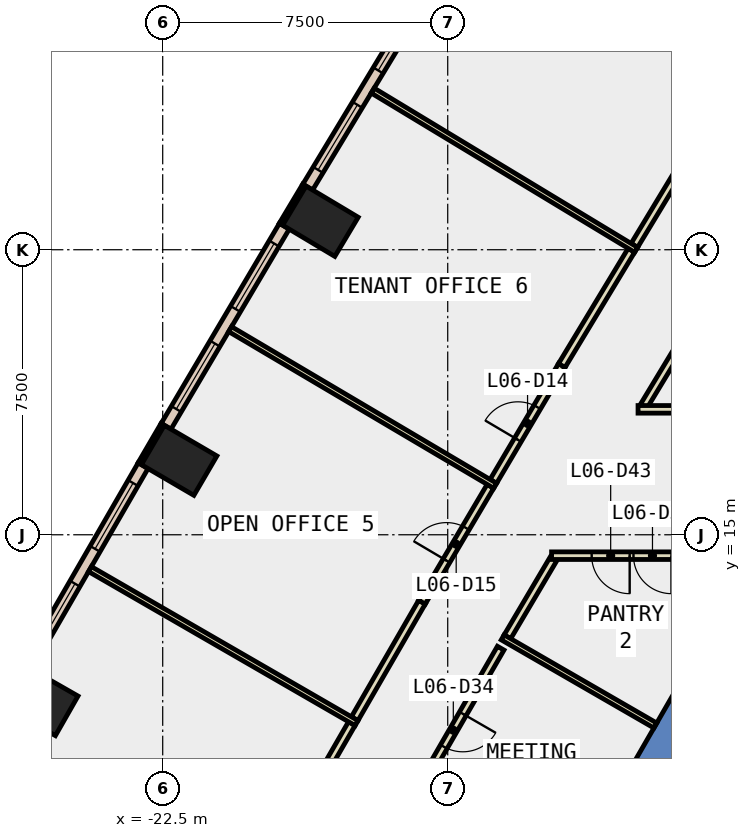
"""IFC4 building model, lengths in metres.
Left out: names, types, materials, properties, quantities, classifications, styles, units other than length and angle.
Written with IfcOpenShell. Run it as: python <this file> out.ifc"""

import sys

from ifc_helpers import new_model, si_unit, direction, frame, frame_2d, origin, origin_2d, place, context, subcontext, project, spatial, polyline, rectangle, outline, extrude, element, fill, save


model = new_model("IFC4")
c1 = context("Model", 3, precision=1e-05, world=origin(), true_north=direction((0.0, 1.0)))
c2 = subcontext(c1, "Body", "Model", "MODEL_VIEW")
j1 = project(units=[si_unit("LENGTHUNIT", "METRE"), si_unit("PLANEANGLEUNIT", "RADIAN")], contexts=[c1])
p1 = place(None, origin())
s1 = spatial("IfcSite", under=j1, at=p1, CompositionType="ELEMENT")
p2 = place(p1, origin())
s2 = spatial("IfcBuilding", under=s1, at=p2, CompositionType="ELEMENT")
p3 = place(p2, frame((0.0, 0.0, 35.0)))
s3 = spatial("IfcBuildingStorey", under=s2, at=p3, CompositionType="ELEMENT", Elevation=35.0)
for number, where, z_axis, x_axis in (
    (1, (-18.35, 23.25, -0.6), (0.0, 0.0, 1.0), (0.513, 0.858, 0.0)),
    (2, (-22.068, 16.959, -0.6), (0.0, 0.0, 1.0), (0.504, 0.864, 0.0)),
    (3, (-25.721, 10.632, -0.6), (0.0, 0.0, 1.0), (0.496, 0.869, 0.0)),
):
    element("IfcColumn", number, at=place(p3, frame(where, z_axis=z_axis, x_axis=x_axis)), inside=s3, PredefinedType="COLUMN", context=c2, shape_type="SweptSolid", body=[
        extrude(rectangle(XDim=1.2, YDim=1.6, at=origin_2d()), origin(), (0.0, 0.0, 1.0), 4.4),
    ])
p4 = place(p3, frame((0.0, 0.0, -0.6)))
e4 = element("IfcWall", 4, at=p4, inside=s3, PredefinedType="SHEAR", context=c2, shape_type="SweptSolid", body=[
    extrude(outline(polyline([(-12.267, 5.252), (-11.402, 4.752), (-6.351, 13.5), (-6.928, 14.5), (-12.267, 5.252)])), origin(), (0.0, 0.0, 1.0), 4.4),
])
p5 = place(p3, frame((-18.772, 24.201, 0.0), z_axis=(0.0, 0.0, 1.0), x_axis=(-0.513238760752, -0.858245870635, 0.0)))
e5 = element("IfcWall", 5, at=p5, inside=s3, PredefinedType="STANDARD", context=c2, shape_type="SweptSolid", body=[
    extrude(rectangle(XDim=1.2, YDim=0.1, at=frame_2d((0.6, 0.0))), origin(), (0.0, 0.0, 1.0), 3.8),
])
p6 = place(p3, frame((-22.499, 17.906, 0.0), z_axis=(0.0, 0.0, 1.0), x_axis=(-0.504313844903, -0.863520437418, 0.0)))
e6 = element("IfcWall", 6, at=p6, inside=s3, PredefinedType="STANDARD", context=c2, shape_type="SweptSolid", body=[
    extrude(rectangle(XDim=1.2, YDim=0.1, at=frame_2d((0.6, 0.0))), origin(), (0.0, 0.0, 1.0), 3.8),
])
p7 = place(p3, frame((-15.521, 29.382, 0.0), z_axis=(0.0, 0.0, 1.0), x_axis=(-0.517211293816, -0.855857743757, 0.0)))
e7 = element("IfcWall", 7, at=p7, inside=s3, PredefinedType="STANDARD", context=c2, shape_type="SweptSolid", body=[
    extrude(rectangle(XDim=6.116, YDim=0.3, at=frame_2d((3.058, 0.0))), origin(), (0.0, 0.0, 1.0), 3.8),
])
p8 = place(p7, frame((0.529, 0.0, 0.9)))
e8 = element("IfcOpeningElement", 8, at=p8, cuts=e7, PredefinedType="OPENING", context=c2, shape_type="SweptSolid", body=[
    extrude(rectangle(XDim=2.0, YDim=2.6, at=frame_2d((1.0, 1.3))), frame((0.0, 0.16, 0.0), z_axis=(0.0, -1.0, 0.0), x_axis=(1.0, 0.0, 0.0)), (0.0, 0.0, 1.0), 0.32),
])
p9 = place(p7, frame((3.587, 0.0, 0.9)))
e9 = element("IfcOpeningElement", 9, at=p9, cuts=e7, PredefinedType="OPENING", context=c2, shape_type="SweptSolid", body=[
    extrude(rectangle(XDim=2.0, YDim=2.6, at=frame_2d((1.0, 1.3))), frame((0.0, 0.16, 0.0), z_axis=(0.0, -1.0, 0.0), x_axis=(1.0, 0.0, 0.0)), (0.0, 0.0, 1.0), 0.32),
])
p10 = place(p3, frame((-19.299, 23.119, 0.0), z_axis=(0.0, 0.0, 1.0), x_axis=(-0.508749483145, -0.860914608658, 0.0)))
e10 = element("IfcWall", 10, at=p10, inside=s3, PredefinedType="STANDARD", context=c2, shape_type="SweptSolid", body=[
    extrude(rectangle(XDim=6.117, YDim=0.3, at=frame_2d((3.058, 0.0))), origin(), (0.0, 0.0, 1.0), 3.8),
])
p11 = place(p10, frame((0.529, 0.0, 0.9)))
e11 = element("IfcOpeningElement", 11, at=p11, cuts=e10, PredefinedType="OPENING", context=c2, shape_type="SweptSolid", body=[
    extrude(rectangle(XDim=2.0, YDim=2.6, at=frame_2d((1.0, 1.3))), frame((0.0, 0.16, 0.0), z_axis=(0.0, -1.0, 0.0), x_axis=(1.0, 0.0, 0.0)), (0.0, 0.0, 1.0), 0.32),
])
p12 = place(p10, frame((3.588, 0.0, 0.9)))
e12 = element("IfcOpeningElement", 12, at=p12, cuts=e10, PredefinedType="OPENING", context=c2, shape_type="SweptSolid", body=[
    extrude(rectangle(XDim=2.0, YDim=2.6, at=frame_2d((1.0, 1.3))), frame((0.0, 0.16, 0.0), z_axis=(0.0, -1.0, 0.0), x_axis=(1.0, 0.0, 0.0)), (0.0, 0.0, 1.0), 0.32),
])
p13 = place(p3, frame((-23.015, 16.819, 0.0), z_axis=(0.0, 0.0, 1.0), x_axis=(-0.499976985038, -0.866038691071, 0.0)))
e13 = element("IfcWall", 13, at=p13, inside=s3, PredefinedType="STANDARD", context=c2, shape_type="SweptSolid", body=[
    extrude(rectangle(XDim=6.116, YDim=0.3, at=frame_2d((3.058, 0.0))), origin(), (0.0, 0.0, 1.0), 3.8),
])
p14 = place(p13, frame((0.529, 0.0, 0.9)))
e14 = element("IfcOpeningElement", 14, at=p14, cuts=e13, PredefinedType="OPENING", context=c2, shape_type="SweptSolid", body=[
    extrude(rectangle(XDim=2.0, YDim=2.6, at=frame_2d((1.0, 1.3))), frame((0.0, 0.16, 0.0), z_axis=(0.0, -1.0, 0.0), x_axis=(1.0, 0.0, 0.0)), (0.0, 0.0, 1.0), 0.32),
])
p15 = place(p13, frame((3.587, 0.0, 0.9)))
e15 = element("IfcOpeningElement", 15, at=p15, cuts=e13, PredefinedType="OPENING", context=c2, shape_type="SweptSolid", body=[
    extrude(rectangle(XDim=2.0, YDim=2.6, at=frame_2d((1.0, 1.3))), frame((0.0, 0.16, 0.0), z_axis=(0.0, -1.0, 0.0), x_axis=(1.0, 0.0, 0.0)), (0.0, 0.0, 1.0), 0.32),
])
p16 = place(p3, frame((-13.606, 12.016, 0.0), z_axis=(0.0, 0.0, 1.0), x_axis=(-0.499992180995, -0.866029918042, 0.0)))
e16 = element("IfcWall", 16, at=p16, inside=s3, PredefinedType="PARTITIONING", context=c2, shape_type="SweptSolid", body=[
    extrude(rectangle(XDim=4.988, YDim=0.2, at=frame_2d((2.494, 0.0))), origin(), (0.0, 0.0, 1.0), 3.8),
])
p17 = place(p16, frame((1.994, 0.0, 0.0)))
e17 = element("IfcOpeningElement", 17, at=p17, cuts=e16, PredefinedType="OPENING", context=c2, shape_type="SweptSolid", body=[
    extrude(rectangle(XDim=1.0, YDim=2.1, at=frame_2d((0.5, 1.05))), frame((0.0, 0.11, 0.0), z_axis=(0.0, -1.0, 0.0), x_axis=(1.0, 0.0, 0.0)), (0.0, 0.0, 1.0), 0.22),
])
p18 = place(p3, frame((-12.218, 14.364, 0.0), z_axis=(0.0, 0.0, 1.0), x_axis=(-0.508767325294, -0.860904064756, 0.0)))
e18 = element("IfcWall", 18, at=p18, inside=s3, PredefinedType="PARTITIONING", context=c2, shape_type="SweptSolid", body=[
    extrude(rectangle(XDim=2.38, YDim=0.2, at=frame_2d((1.19, 0.0))), origin(), (0.0, 0.0, 1.0), 3.8),
])
p19 = place(p3, frame((-6.209, 24.392, 0.0), z_axis=(0.0, 0.0, 1.0), x_axis=(-0.51736780002, -0.85576314451, 0.0)))
e19 = element("IfcWall", 19, at=p19, inside=s3, PredefinedType="PARTITIONING", context=c2, shape_type="SweptSolid", body=[
    extrude(rectangle(XDim=7.018, YDim=0.2, at=frame_2d((3.509, 0.0))), origin(), (0.0, 0.0, 1.0), 3.8),
])
p20 = place(p3, frame((-10.089, 22.613, 0.0), z_axis=(0.0, 0.0, 1.0), x_axis=(0.517280808896, 0.855815730603, 0.0)))
e20 = element("IfcWall", 20, at=p20, inside=s3, PredefinedType="PARTITIONING", context=c2, shape_type="SweptSolid", body=[
    extrude(rectangle(XDim=3.542, YDim=0.2, at=frame_2d((1.771, 0.0))), origin(), (0.0, 0.0, 1.0), 3.8),
])
p21 = place(p3, frame((-13.8, 16.404, 0.0), z_axis=(0.0, 0.0, 1.0), x_axis=(0.508666621784, 0.860963569428, 0.0)))
e21 = element("IfcWall", 21, at=p21, inside=s3, PredefinedType="PARTITIONING", context=c2, shape_type="SweptSolid", body=[
    extrude(rectangle(XDim=3.542, YDim=0.2, at=frame_2d((1.771, 0.0))), origin(), (0.0, 0.0, 1.0), 3.8),
])
p22 = place(p21, frame((1.271, 0.0, 0.0)))
e22 = element("IfcOpeningElement", 22, at=p22, cuts=e21, PredefinedType="OPENING", context=c2, shape_type="SweptSolid", body=[
    extrude(rectangle(XDim=1.0, YDim=2.1, at=frame_2d((0.5, 1.05))), frame((0.0, 0.11, 0.0), z_axis=(0.0, -1.0, 0.0), x_axis=(1.0, 0.0, 0.0)), (0.0, 0.0, 1.0), 0.22),
])
p23 = place(p3, frame((-11.998, 19.454, 0.0), z_axis=(0.0, 0.0, 1.0), x_axis=(0.51707881094, 0.85593779171, 0.0)))
e23 = element("IfcWall", 23, at=p23, inside=s3, PredefinedType="PARTITIONING", context=c2, shape_type="SweptSolid", body=[
    extrude(rectangle(XDim=3.541, YDim=0.2, at=frame_2d((1.771, 0.0))), origin(), (0.0, 0.0, 1.0), 3.8),
])
p24 = place(p3, frame((-17.448, 10.16, 0.0), z_axis=(0.0, 0.0, 1.0), x_axis=(0.499951278228, 0.866053531485, 0.0)))
e24 = element("IfcWall", 24, at=p24, inside=s3, PredefinedType="PARTITIONING", context=c2, shape_type="SweptSolid", body=[
    extrude(rectangle(XDim=3.54, YDim=0.2, at=frame_2d((1.77, 0.0))), origin(), (0.0, 0.0, 1.0), 3.8),
])
p25 = place(p3, frame((-15.678, 13.226, 0.0), z_axis=(0.0, 0.0, 1.0), x_axis=(0.508613166028, 0.860995149431, 0.0)))
e25 = element("IfcWall", 25, at=p25, inside=s3, PredefinedType="PARTITIONING", context=c2, shape_type="SweptSolid", body=[
    extrude(rectangle(XDim=3.541, YDim=0.2, at=frame_2d((1.771, 0.0))), origin(), (0.0, 0.0, 1.0), 3.8),
])
p26 = place(p25, frame((1.271, 0.0, 0.0)))
e26 = element("IfcOpeningElement", 26, at=p26, cuts=e25, PredefinedType="OPENING", context=c2, shape_type="SweptSolid", body=[
    extrude(rectangle(XDim=1.0, YDim=2.1, at=frame_2d((0.5, 1.05))), frame((0.0, 0.11, 0.0), z_axis=(0.0, -1.0, 0.0), x_axis=(1.0, 0.0, 0.0)), (0.0, 0.0, 1.0), 0.22),
])
p27 = place(p3, frame((-19.294, 6.964, 0.0), z_axis=(0.0, 0.0, 1.0), x_axis=(0.499861717316, 0.86610522661, 0.0)))
e27 = element("IfcWall", 27, at=p27, inside=s3, PredefinedType="PARTITIONING", context=c2, shape_type="SweptSolid", body=[
    extrude(rectangle(XDim=3.541, YDim=0.2, at=frame_2d((1.771, 0.0))), origin(), (0.0, 0.0, 1.0), 3.8),
])
p28 = place(p3, frame((-13.554, 12.3, 0.0), z_axis=(0.0, 0.0, 1.0), x_axis=(0.866028685375, -0.499994316075, 0.0)))
e28 = element("IfcWall", 28, at=p28, inside=s3, PredefinedType="PARTITIONING", context=c2, shape_type="SweptSolid", body=[
    extrude(rectangle(XDim=4.638, YDim=0.15, at=frame_2d((2.319, 0.0))), origin(), (0.0, 0.0, 1.0), 3.8),
])
p29 = place(p3, frame((-6.957, 14.45, 0.0), z_axis=(0.0, 0.0, 1.0), x_axis=(-1.0, 0.0, 0.0)))
e29 = element("IfcWall", 29, at=p29, inside=s3, PredefinedType="PARTITIONING", context=c2, shape_type="SweptSolid", body=[
    extrude(rectangle(XDim=5.31, YDim=0.2, at=frame_2d((2.655, 0.0))), origin(), (0.0, 0.0, 1.0), 3.8),
])
p30 = place(p29, frame((2.155, 0.0, 0.0)))
e30 = element("IfcOpeningElement", 30, at=p30, cuts=e29, PredefinedType="OPENING", context=c2, shape_type="SweptSolid", body=[
    extrude(rectangle(XDim=1.0, YDim=2.1, at=frame_2d((0.5, 1.05))), frame((0.0, 0.11, 0.0), z_axis=(0.0, -1.0, 0.0), x_axis=(1.0, 0.0, 0.0)), (0.0, 0.0, 1.0), 0.22),
])
p31 = place(p29, frame((3.255, 0.0, 0.0)))
e31 = element("IfcOpeningElement", 31, at=p31, cuts=e29, PredefinedType="OPENING", context=c2, shape_type="SweptSolid", body=[
    extrude(rectangle(XDim=1.0, YDim=2.1, at=frame_2d((0.5, 1.05))), frame((0.0, 0.11, 0.0), z_axis=(0.0, -1.0, 0.0), x_axis=(1.0, 0.0, 0.0)), (0.0, 0.0, 1.0), 0.22),
])
p32 = place(p3, frame((-9.992, 18.3, 0.0), z_axis=(0.0, 0.0, 1.0), x_axis=(1.0, 0.0, 0.0)))
e32 = element("IfcWall", 32, at=p32, inside=s3, PredefinedType="PARTITIONING", context=c2, shape_type="SweptSolid", body=[
    extrude(rectangle(XDim=9.592, YDim=0.2, at=frame_2d((4.796, 0.0))), origin(), (0.0, 0.0, 1.0), 3.8),
])
p33 = place(p3, frame((-10.042, 22.497, 0.0), z_axis=(0.0, 0.0, 1.0), x_axis=(-0.855818252, 0.517276637346, 0.0)))
e33 = element("IfcWall", 33, at=p33, inside=s3, PredefinedType="PARTITIONING", context=c2, shape_type="SweptSolid", body=[
    extrude(rectangle(XDim=8.1, YDim=0.15, at=frame_2d((4.05, 0.0))), origin(), (0.0, 0.0, 1.0), 3.8),
])
p34 = place(p3, frame((-13.752, 16.289, 0.0), z_axis=(0.0, 0.0, 1.0), x_axis=(-0.86093852802, 0.508709004216, 0.0)))
e34 = element("IfcWall", 34, at=p34, inside=s3, PredefinedType="PARTITIONING", context=c2, shape_type="SweptSolid", body=[
    extrude(rectangle(XDim=8.101, YDim=0.15, at=frame_2d((4.05, 0.0))), origin(), (0.0, 0.0, 1.0), 3.8),
])
p35 = place(p3, frame((-17.399, 10.045, 0.0), z_axis=(0.0, 0.0, 1.0), x_axis=(-0.865980803489, 0.500077242023, 0.0)))
e35 = element("IfcWall", 35, at=p35, inside=s3, PredefinedType="PARTITIONING", context=c2, shape_type="SweptSolid", body=[
    extrude(rectangle(XDim=8.101, YDim=0.15, at=frame_2d((4.05, 0.0))), origin(), (0.0, 0.0, 1.0), 3.8),
])
p36 = place(p8, origin())
e36 = element("IfcWindow", 36, at=p36, inside=s3, PartitioningType="SINGLE_PANEL", PredefinedType="WINDOW", context=c2, shape_type="SweptSolid", body=[
    extrude(rectangle(XDim=2.0, YDim=2.6, at=frame_2d((1.0, 1.3))), frame((0.0, 0.03, 0.0), z_axis=(0.0, -1.0, 0.0), x_axis=(1.0, 0.0, 0.0)), (0.0, 0.0, 1.0), 0.06),
])
fill(e8, e36)
p37 = place(p9, origin())
e37 = element("IfcWindow", 37, at=p37, inside=s3, PartitioningType="SINGLE_PANEL", PredefinedType="WINDOW", context=c2, shape_type="SweptSolid", body=[
    extrude(rectangle(XDim=2.0, YDim=2.6, at=frame_2d((1.0, 1.3))), frame((0.0, 0.03, 0.0), z_axis=(0.0, -1.0, 0.0), x_axis=(1.0, 0.0, 0.0)), (0.0, 0.0, 1.0), 0.06),
])
fill(e9, e37)
p38 = place(p11, origin())
e38 = element("IfcWindow", 38, at=p38, inside=s3, PartitioningType="SINGLE_PANEL", PredefinedType="WINDOW", context=c2, shape_type="SweptSolid", body=[
    extrude(rectangle(XDim=2.0, YDim=2.6, at=frame_2d((1.0, 1.3))), frame((0.0, 0.03, 0.0), z_axis=(0.0, -1.0, 0.0), x_axis=(1.0, 0.0, 0.0)), (0.0, 0.0, 1.0), 0.06),
])
fill(e11, e38)
p39 = place(p12, origin())
e39 = element("IfcWindow", 39, at=p39, inside=s3, PartitioningType="SINGLE_PANEL", PredefinedType="WINDOW", context=c2, shape_type="SweptSolid", body=[
    extrude(rectangle(XDim=2.0, YDim=2.6, at=frame_2d((1.0, 1.3))), frame((0.0, 0.03, 0.0), z_axis=(0.0, -1.0, 0.0), x_axis=(1.0, 0.0, 0.0)), (0.0, 0.0, 1.0), 0.06),
])
fill(e12, e39)
p40 = place(p14, origin())
e40 = element("IfcWindow", 40, at=p40, inside=s3, PartitioningType="SINGLE_PANEL", PredefinedType="WINDOW", context=c2, shape_type="SweptSolid", body=[
    extrude(rectangle(XDim=2.0, YDim=2.6, at=frame_2d((1.0, 1.3))), frame((0.0, 0.03, 0.0), z_axis=(0.0, -1.0, 0.0), x_axis=(1.0, 0.0, 0.0)), (0.0, 0.0, 1.0), 0.06),
])
fill(e14, e40)
p41 = place(p15, origin())
e41 = element("IfcWindow", 41, at=p41, inside=s3, PartitioningType="SINGLE_PANEL", PredefinedType="WINDOW", context=c2, shape_type="SweptSolid", body=[
    extrude(rectangle(XDim=2.0, YDim=2.6, at=frame_2d((1.0, 1.3))), frame((0.0, 0.03, 0.0), z_axis=(0.0, -1.0, 0.0), x_axis=(1.0, 0.0, 0.0)), (0.0, 0.0, 1.0), 0.06),
])
fill(e15, e41)
p42 = place(p22, origin())
e42 = element("IfcDoor", 42, at=p42, inside=s3, OperationType="SINGLE_SWING_LEFT", PredefinedType="DOOR", context=c2, shape_type="SweptSolid", body=[
    extrude(rectangle(XDim=1.0, YDim=2.1, at=frame_2d((0.5, 1.05))), frame((0.0, 0.025, 0.0), z_axis=(0.0, -1.0, 0.0), x_axis=(1.0, 0.0, 0.0)), (0.0, 0.0, 1.0), 0.05),
])
fill(e22, e42)
p43 = place(p26, origin())
e43 = element("IfcDoor", 43, at=p43, inside=s3, OperationType="SINGLE_SWING_LEFT", PredefinedType="DOOR", context=c2, shape_type="SweptSolid", body=[
    extrude(rectangle(XDim=1.0, YDim=2.1, at=frame_2d((0.5, 1.05))), frame((0.0, 0.025, 0.0), z_axis=(0.0, -1.0, 0.0), x_axis=(1.0, 0.0, 0.0)), (0.0, 0.0, 1.0), 0.05),
])
fill(e26, e43)
p44 = place(p17, origin())
e44 = element("IfcDoor", 44, at=p44, inside=s3, OperationType="SINGLE_SWING_LEFT", PredefinedType="DOOR", context=c2, shape_type="SweptSolid", body=[
    extrude(rectangle(XDim=1.0, YDim=2.1, at=frame_2d((0.5, 1.05))), frame((0.0, 0.025, 0.0), z_axis=(0.0, -1.0, 0.0), x_axis=(1.0, 0.0, 0.0)), (0.0, 0.0, 1.0), 0.05),
])
fill(e17, e44)
p45 = place(p30, origin())
e45 = element("IfcDoor", 45, at=p45, inside=s3, OperationType="SINGLE_SWING_LEFT", PredefinedType="DOOR", context=c2, shape_type="SweptSolid", body=[
    extrude(rectangle(XDim=1.0, YDim=2.1, at=frame_2d((0.5, 1.05))), frame((0.0, 0.025, 0.0), z_axis=(0.0, -1.0, 0.0), x_axis=(1.0, 0.0, 0.0)), (0.0, 0.0, 1.0), 0.05),
])
fill(e30, e45)
p46 = place(p31, origin())
e46 = element("IfcDoor", 46, at=p46, inside=s3, OperationType="SINGLE_SWING_RIGHT", PredefinedType="DOOR", context=c2, shape_type="SweptSolid", body=[
    extrude(rectangle(XDim=1.0, YDim=2.1, at=frame_2d((0.5, 1.05))), frame((0.0, 0.025, 0.0), z_axis=(0.0, -1.0, 0.0), x_axis=(1.0, 0.0, 0.0)), (0.0, 0.0, 1.0), 0.05),
])
fill(e31, e46)
save(model, sys.argv[1])
